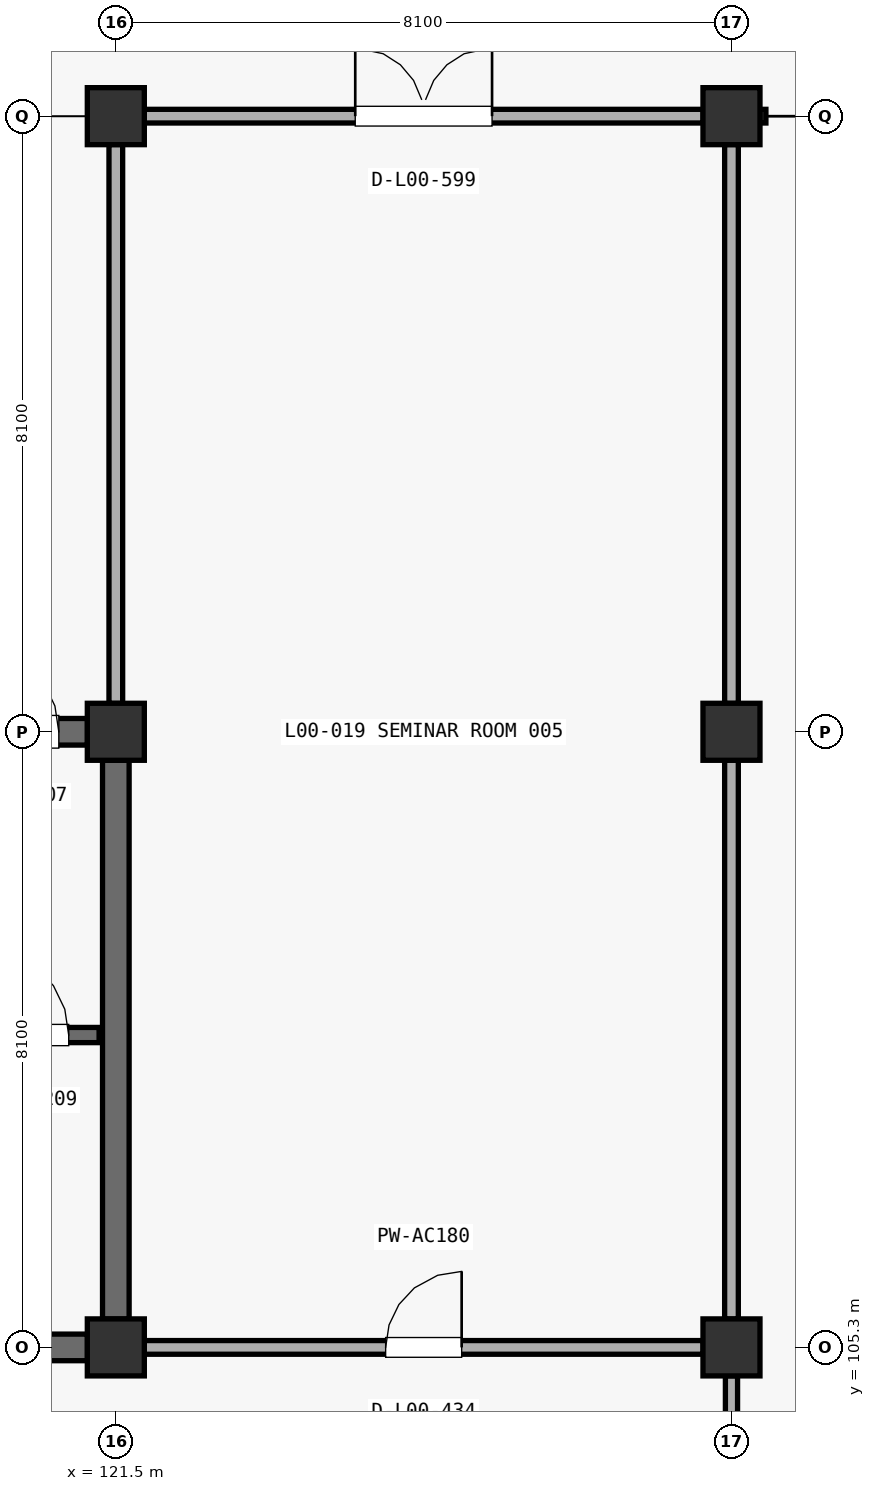
"""IFC4 building model, lengths in metres.
Left out: names, types, materials, properties, quantities, classifications, styles, units other than length and angle.
Written with IfcOpenShell. Run it as: python <this file> out.ifc"""

import sys

from ifc_helpers import new_model, si_unit, direction, frame, frame_2d, origin, origin_2d, place, context, subcontext, project, spatial, rectangle, extrude, element, fill, save


model = new_model("IFC4")
c1 = context("Model", 3, precision=1e-05, world=origin(), true_north=direction((0.0, 1.0)))
c2 = subcontext(c1, "Body", "Model", "MODEL_VIEW")
j1 = project(units=[si_unit("LENGTHUNIT", "METRE"), si_unit("PLANEANGLEUNIT", "RADIAN")], contexts=[c1])
p1 = place(None, origin())
s1 = spatial("IfcSite", under=j1, at=p1, CompositionType="ELEMENT")
p2 = place(p1, origin())
s2 = spatial("IfcBuilding", under=s1, at=p2, CompositionType="ELEMENT")
p3 = place(p2, origin())
s3 = spatial("IfcBuildingStorey", under=s2, at=p3, CompositionType="ELEMENT", Elevation=0.0)
for number, where, z_axis, x_axis in (
    (1, (121.5, 105.3, 0.0), (0.0, 0.0, 1.0), (1.0, 0.0, 0.0)),
    (2, (121.5, 113.4, 0.0), (0.0, 0.0, 1.0), (1.0, 0.0, 0.0)),
    (3, (121.5, 121.5, 0.0), (0.0, 0.0, 1.0), (1.0, 0.0, 0.0)),
    (4, (129.6, 105.3, 0.0), (0.0, 0.0, 1.0), (1.0, 0.0, 0.0)),
    (5, (129.6, 113.4, 0.0), (0.0, 0.0, 1.0), (1.0, 0.0, 0.0)),
    (6, (129.6, 121.5, 0.0), (0.0, 0.0, 1.0), (1.0, 0.0, 0.0)),
):
    element("IfcColumn", number, at=place(p3, frame(where, z_axis=z_axis, x_axis=x_axis)), inside=s3, PredefinedType="COLUMN", context=c2, shape_type="SweptSolid", body=[
        extrude(rectangle(XDim=0.75, YDim=0.75, at=origin_2d()), origin(), (0.0, 0.0, 1.0), 5.1),
    ])
p4 = place(p3, frame((113.773, 113.4, 0.0), z_axis=(0.0, 0.0, 1.0), x_axis=(1.0, 0.0, 0.0)))
e7 = element("IfcWall", 7, at=p4, inside=s3, PredefinedType="SHEAR", context=c2, shape_type="SweptSolid", body=[
    extrude(rectangle(XDim=7.354, YDim=0.35, at=frame_2d((3.677, 0.0))), origin(), (0.0, 0.0, 1.0), 4.822),
])
p5 = place(p4, frame((5.827, 0.0, 0.0)))
e8 = element("IfcOpeningElement", 8, at=p5, cuts=e7, PredefinedType="OPENING", context=c2, shape_type="SweptSolid", body=[
    extrude(rectangle(XDim=1.15, YDim=2.2, at=frame_2d((0.575, 1.1))), frame((0.0, 0.185, 0.0), z_axis=(0.0, -1.0, 0.0), x_axis=(1.0, 0.0, 0.0)), (0.0, 0.0, 1.0), 0.37),
])
p6 = place(p3, frame((121.5, 105.673, 0.0), z_axis=(0.0, 0.0, 1.0), x_axis=(0.0, 1.0, 0.0)))
e9 = element("IfcWall", 9, at=p6, inside=s3, PredefinedType="SHEAR", context=c2, shape_type="SweptSolid", body=[
    extrude(rectangle(XDim=7.354, YDim=0.35, at=frame_2d((3.677, 0.0))), origin(), (0.0, 0.0, 1.0), 4.822),
])
p7 = place(p3, frame((113.773, 105.3, 0.0), z_axis=(0.0, 0.0, 1.0), x_axis=(1.0, 0.0, 0.0)))
e10 = element("IfcWall", 10, at=p7, inside=s3, PredefinedType="SHEAR", context=c2, shape_type="SweptSolid", body=[
    extrude(rectangle(XDim=7.354, YDim=0.35, at=frame_2d((3.677, 0.0))), origin(), (0.0, 0.0, 1.0), 4.822),
])
p8 = place(p7, frame((5.104, 0.0, 0.0)))
e11 = element("IfcOpeningElement", 11, at=p8, cuts=e10, PredefinedType="OPENING", context=c2, shape_type="SweptSolid", body=[
    extrude(rectangle(XDim=1.2, YDim=2.2, at=frame_2d((0.6, 1.1))), frame((0.0, 0.185, 0.0), z_axis=(0.0, -1.0, 0.0), x_axis=(1.0, 0.0, 0.0)), (0.0, 0.0, 1.0), 0.37),
])
p9 = place(p3, frame((113.62, 109.41, 0.0), z_axis=(0.0, 0.0, 1.0), x_axis=(1.0, 0.0, 0.0)))
e12 = element("IfcWall", 12, at=p9, inside=s3, PredefinedType="SHEAR", context=c2, shape_type="SweptSolid", body=[
    extrude(rectangle(XDim=7.66, YDim=0.2, at=frame_2d((3.83, 0.0))), origin(), (0.0, 0.0, 1.0), 4.822),
])
p10 = place(p9, frame((6.11, 0.0, 0.0)))
e13 = element("IfcOpeningElement", 13, at=p10, cuts=e12, PredefinedType="OPENING", context=c2, shape_type="SweptSolid", body=[
    extrude(rectangle(XDim=1.15, YDim=2.2, at=frame_2d((0.575, 1.1))), frame((0.0, 0.11, 0.0), z_axis=(0.0, -1.0, 0.0), x_axis=(1.0, 0.0, 0.0)), (0.0, 0.0, 1.0), 0.22),
])
p11 = place(p3, frame((121.873, 105.3, 0.0), z_axis=(0.0, 0.0, 1.0), x_axis=(1.0, 0.0, 0.0)))
e14 = element("IfcWall", 14, at=p11, inside=s3, PredefinedType="PARTITIONING", context=c2, shape_type="SweptSolid", body=[
    extrude(rectangle(XDim=7.354, YDim=0.18, at=frame_2d((3.677, 0.0))), origin(), (0.0, 0.0, 1.0), 3.872),
])
p12 = place(p11, frame((3.177, 0.0, 0.0)))
e15 = element("IfcOpeningElement", 15, at=p12, cuts=e14, PredefinedType="OPENING", context=c2, shape_type="SweptSolid", body=[
    extrude(rectangle(XDim=1.0, YDim=2.15, at=frame_2d((0.5, 1.075))), frame((0.0, 0.1, 0.0), z_axis=(0.0, -1.0, 0.0), x_axis=(1.0, 0.0, 0.0)), (0.0, 0.0, 1.0), 0.2),
])
p13 = place(p3, frame((129.6, 105.673, 0.0), z_axis=(0.0, 0.0, 1.0), x_axis=(0.0, 1.0, 0.0)))
e16 = element("IfcWall", 16, at=p13, inside=s3, PredefinedType="PARTITIONING", context=c2, shape_type="SweptSolid", body=[
    extrude(rectangle(XDim=7.354, YDim=0.18, at=frame_2d((3.677, 0.0))), origin(), (0.0, 0.0, 1.0), 4.172),
])
p14 = place(p3, frame((129.6, 113.773, 0.0), z_axis=(0.0, 0.0, 1.0), x_axis=(0.0, 1.0, 0.0)))
e17 = element("IfcWall", 17, at=p14, inside=s3, PredefinedType="PARTITIONING", context=c2, shape_type="SweptSolid", body=[
    extrude(rectangle(XDim=7.354, YDim=0.18, at=frame_2d((3.677, 0.0))), origin(), (0.0, 0.0, 1.0), 4.222),
])
p15 = place(p3, frame((121.5, 113.773, 0.0), z_axis=(0.0, 0.0, 1.0), x_axis=(0.0, 1.0, 0.0)))
e18 = element("IfcWall", 18, at=p15, inside=s3, PredefinedType="PARTITIONING", context=c2, shape_type="SweptSolid", body=[
    extrude(rectangle(XDim=7.354, YDim=0.18, at=frame_2d((3.677, 0.0))), origin(), (0.0, 0.0, 1.0), 4.072),
])
p16 = place(p3, frame((121.873, 121.5, 0.0), z_axis=(0.0, 0.0, 1.0), x_axis=(1.0, 0.0, 0.0)))
e19 = element("IfcWall", 19, at=p16, inside=s3, PredefinedType="PARTITIONING", context=c2, shape_type="SweptSolid", body=[
    extrude(rectangle(XDim=7.354, YDim=0.18, at=frame_2d((3.677, 0.0))), origin(), (0.0, 0.0, 1.0), 4.172),
])
p17 = place(p16, frame((2.777, 0.0, 0.0)))
e20 = element("IfcOpeningElement", 20, at=p17, cuts=e19, PredefinedType="OPENING", context=c2, shape_type="SweptSolid", body=[
    extrude(rectangle(XDim=1.8, YDim=2.2, at=frame_2d((0.9, 1.1))), frame((0.0, 0.1, 0.0), z_axis=(0.0, -1.0, 0.0), x_axis=(1.0, 0.0, 0.0)), (0.0, 0.0, 1.0), 0.2),
])
p18 = place(p3, frame((129.6, 97.573, 0.0), z_axis=(0.0, 0.0, 1.0), x_axis=(0.0, 1.0, 0.0)))
e21 = element("IfcWall", 21, at=p18, inside=s3, PredefinedType="PARTITIONING", context=c2, shape_type="SweptSolid", body=[
    extrude(rectangle(XDim=7.354, YDim=0.16, at=frame_2d((3.677, 0.0))), origin(), (0.0, 0.0, 1.0), 4.072),
])
p19 = place(p5, origin())
e22 = element("IfcDoor", 22, at=p19, inside=s3, OperationType="SINGLE_SWING_LEFT", PredefinedType="DOOR", context=c2, shape_type="SweptSolid", body=[
    extrude(rectangle(XDim=1.15, YDim=2.2, at=frame_2d((0.575, 1.1))), frame((0.0, 0.025, 0.0), z_axis=(0.0, -1.0, 0.0), x_axis=(1.0, 0.0, 0.0)), (0.0, 0.0, 1.0), 0.05),
])
fill(e8, e22)
p20 = place(p10, origin())
e23 = element("IfcDoor", 23, at=p20, inside=s3, OperationType="SINGLE_SWING_LEFT", PredefinedType="DOOR", context=c2, shape_type="SweptSolid", body=[
    extrude(rectangle(XDim=1.15, YDim=2.2, at=frame_2d((0.575, 1.1))), frame((0.0, 0.025, 0.0), z_axis=(0.0, -1.0, 0.0), x_axis=(1.0, 0.0, 0.0)), (0.0, 0.0, 1.0), 0.05),
])
fill(e13, e23)
p21 = place(p12, origin())
e24 = element("IfcDoor", 24, at=p21, inside=s3, OperationType="SINGLE_SWING_RIGHT", PredefinedType="DOOR", context=c2, shape_type="SweptSolid", body=[
    extrude(rectangle(XDim=1.0, YDim=2.15, at=frame_2d((0.5, 1.075))), frame((0.0, 0.025, 0.0), z_axis=(0.0, -1.0, 0.0), x_axis=(1.0, 0.0, 0.0)), (0.0, 0.0, 1.0), 0.05),
])
fill(e15, e24)
p22 = place(p17, origin())
e25 = element("IfcDoor", 25, at=p22, inside=s3, OperationType="DOUBLE_SWING_LEFT", PredefinedType="DOOR", context=c2, shape_type="SweptSolid", body=[
    extrude(rectangle(XDim=1.8, YDim=2.2, at=frame_2d((0.9, 1.1))), frame((0.0, 0.025, 0.0), z_axis=(0.0, -1.0, 0.0), x_axis=(1.0, 0.0, 0.0)), (0.0, 0.0, 1.0), 0.05),
])
fill(e20, e25)
save(model, sys.argv[1])
